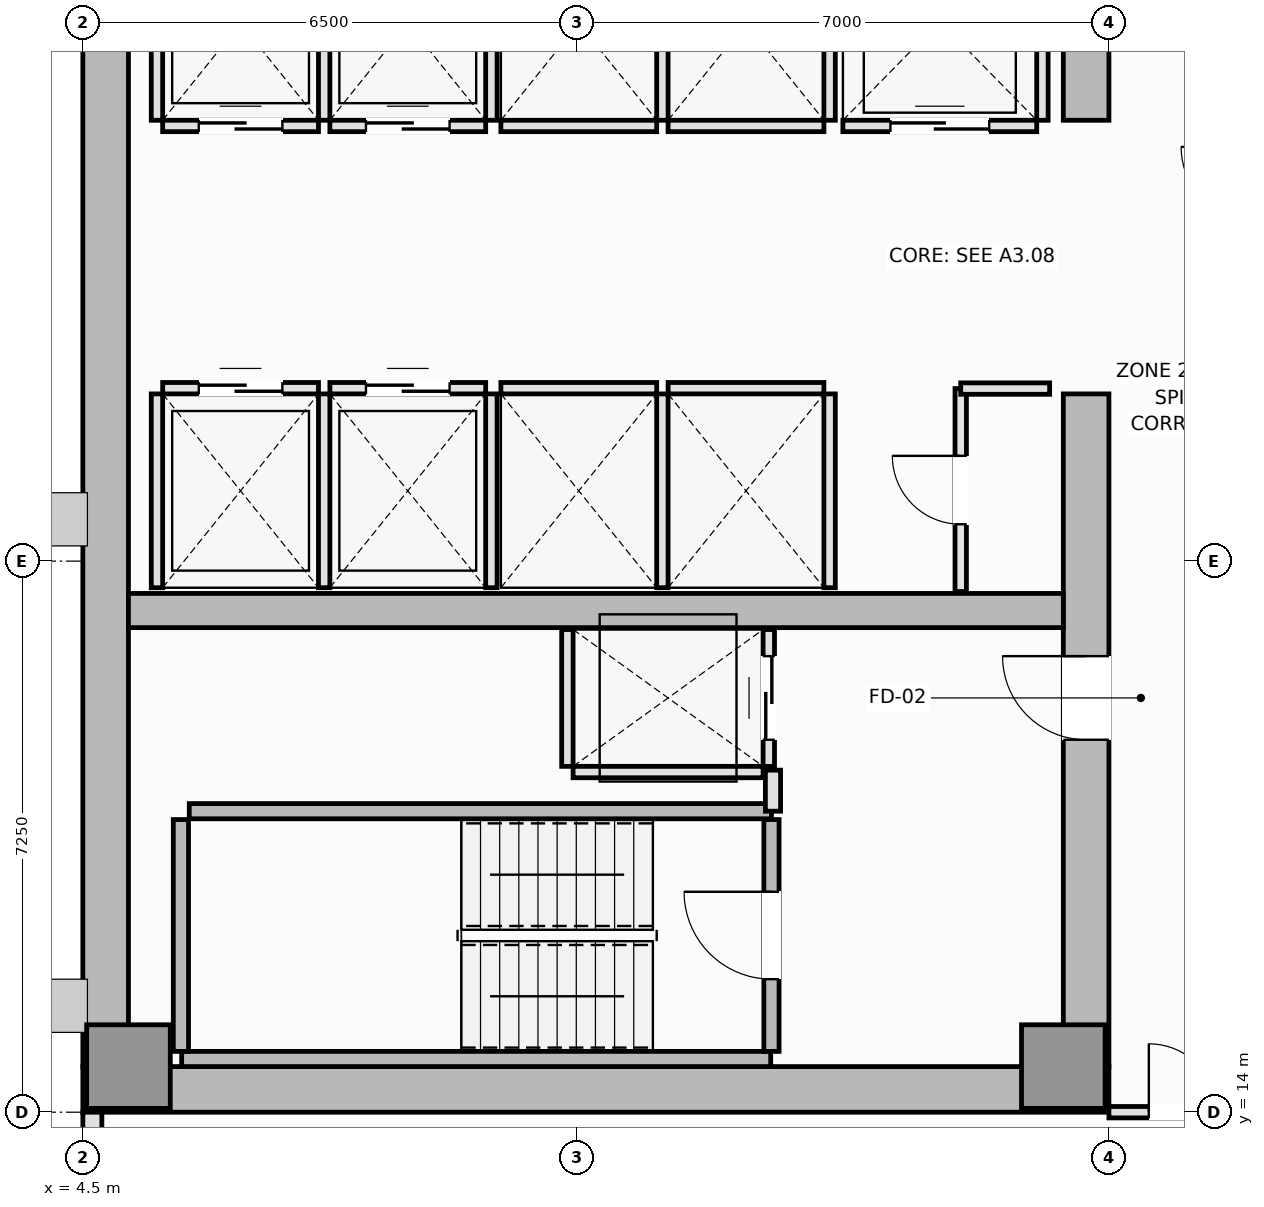
"""IFC4 building model, lengths in metres.
Left out: names, types, materials, properties, quantities, classifications, styles, units other than length and angle.
Written with IfcOpenShell. Run it as: python <this file> out.ifc"""

import sys

from ifc_helpers import new_model, si_unit, direction, frame, frame_2d, origin, origin_2d, place, context, subcontext, project, spatial, rectangle, extrude, element, fill, save


model = new_model("IFC4")
c1 = context("Model", 3, precision=1e-05, world=origin(), true_north=direction((0.0, 1.0)))
c2 = subcontext(c1, "Body", "Model", "MODEL_VIEW")
j1 = project(units=[si_unit("LENGTHUNIT", "METRE"), si_unit("PLANEANGLEUNIT", "RADIAN")], contexts=[c1])
p1 = place(None, origin())
s1 = spatial("IfcSite", under=j1, at=p1, CompositionType="ELEMENT")
p2 = place(p1, origin())
s2 = spatial("IfcBuilding", under=s1, at=p2, CompositionType="ELEMENT")
p3 = place(p2, frame((0.0, 0.0, 166.15)))
s3 = spatial("IfcBuildingStorey", under=s2, at=p3, CompositionType="ELEMENT", Elevation=166.15)
p4 = place(p3, frame((4.5, 14.3, 0.0), z_axis=(0.0, 0.0, 1.0), x_axis=(1.0, 0.0, 0.0)))
e1 = element("IfcWall", 1, at=p4, inside=s3, PredefinedType="SHEAR", context=c2, shape_type="SweptSolid", body=[
    extrude(rectangle(XDim=13.5, YDim=0.6, at=frame_2d((6.75, 0.0))), origin(), (0.0, 0.0, 1.0), 3.55),
])
p5 = place(p3, frame((4.8, 14.6, 0.0), z_axis=(0.0, 0.0, 1.0), x_axis=(0.0, 1.0, 0.0)))
e2 = element("IfcWall", 2, at=p5, inside=s3, PredefinedType="SHEAR", context=c2, shape_type="SweptSolid", body=[
    extrude(rectangle(XDim=21.3, YDim=0.6, at=frame_2d((10.65, 0.0))), origin(), (0.0, 0.0, 1.0), 3.55),
])
p6 = place(p3, frame((17.7, 14.6, 0.0), z_axis=(0.0, 0.0, 1.0), x_axis=(0.0, 1.0, 0.0)))
e3 = element("IfcWall", 3, at=p6, inside=s3, PredefinedType="SHEAR", context=c2, shape_type="SweptSolid", body=[
    extrude(rectangle(XDim=8.85, YDim=0.6, at=frame_2d((4.425, 0.0))), origin(), (0.0, 0.0, 1.0), 3.55),
])
p7 = place(p6, frame((4.3, 0.0, 0.0)))
e4 = element("IfcOpeningElement", 4, at=p7, cuts=e3, PredefinedType="OPENING", context=c2, shape_type="SweptSolid", body=[
    extrude(rectangle(XDim=1.1, YDim=2.15, at=frame_2d((0.55, 1.075))), frame((0.0, 0.31, 0.0), z_axis=(0.0, -1.0, 0.0), x_axis=(1.0, 0.0, 0.0)), (0.0, 0.0, 1.0), 0.62),
])
p8 = place(p3, frame((17.7, 27.05, 0.0), z_axis=(0.0, 0.0, 1.0), x_axis=(0.0, 1.0, 0.0)))
e5 = element("IfcWall", 5, at=p8, inside=s3, PredefinedType="SHEAR", context=c2, shape_type="SweptSolid", body=[
    extrude(rectangle(XDim=8.85, YDim=0.6, at=frame_2d((4.425, 0.0))), origin(), (0.0, 0.0, 1.0), 3.55),
])
p9 = place(p8, frame((3.45, 0.0, 0.0)))
e6 = element("IfcOpeningElement", 6, at=p9, cuts=e5, PredefinedType="OPENING", context=c2, shape_type="SweptSolid", body=[
    extrude(rectangle(XDim=1.1, YDim=2.15, at=frame_2d((0.55, 1.075))), frame((0.0, 0.31, 0.0), z_axis=(0.0, -1.0, 0.0), x_axis=(1.0, 0.0, 0.0)), (0.0, 0.0, 1.0), 0.62),
])
p10 = place(p3, frame((5.1, 20.6, 0.0), z_axis=(0.0, 0.0, 1.0), x_axis=(1.0, 0.0, 0.0)))
e7 = element("IfcWall", 7, at=p10, inside=s3, PredefinedType="SHEAR", context=c2, shape_type="SweptSolid", body=[
    extrude(rectangle(XDim=12.3, YDim=0.45, at=frame_2d((6.15, 0.0))), origin(), (0.0, 0.0, 1.0), 3.55),
])
for number, where, z_axis, x_axis in (
    (8, (5.1, 14.6, 0.0), (0.0, 0.0, 1.0), (1.0, 0.0, 0.0)),
    (9, (17.4, 14.6, 0.0), (0.0, 0.0, 1.0), (1.0, 0.0, 0.0)),
):
    element("IfcColumn", number, at=place(p3, frame(where, z_axis=z_axis, x_axis=x_axis)), inside=s3, PredefinedType="PILASTER", context=c2, shape_type="SweptSolid", body=[
        extrude(rectangle(XDim=1.1, YDim=1.1, at=origin_2d()), origin(), (0.0, 0.0, 1.0), 3.55),
    ])
p11 = place(p3, frame((4.625, 14.0, 0.0), z_axis=(0.0, 0.0, 1.0), x_axis=(0.0, -1.0, 0.0)))
e10 = element("IfcWall", 10, at=p11, inside=s3, PredefinedType="SOLIDWALL", context=c2, shape_type="SweptSolid", body=[
    extrude(rectangle(XDim=6.0, YDim=0.25, at=frame_2d((3.0, 0.0))), origin(), (0.0, 0.0, 1.0), 3.37),
])
p12 = place(p11, frame((1.9, 0.0, 0.9)))
e11 = element("IfcOpeningElement", 11, at=p12, cuts=e10, PredefinedType="OPENING", context=c2, shape_type="SweptSolid", body=[
    extrude(rectangle(XDim=2.2, YDim=1.8, at=frame_2d((1.1, 0.9))), frame((0.0, 0.135, 0.0), z_axis=(0.0, -1.0, 0.0), x_axis=(1.0, 0.0, 0.0)), (0.0, 0.0, 1.0), 0.27),
])
p13 = place(p3, frame((5.8, 14.7, 0.0), z_axis=(0.0, 0.0, 1.0), x_axis=(1.0, 0.0, 0.0)))
e12 = element("IfcWall", 12, at=p13, inside=s3, PredefinedType="SOLIDWALL", context=c2, shape_type="SweptSolid", body=[
    extrude(rectangle(XDim=7.75, YDim=0.2, at=frame_2d((3.875, 0.0))), origin(), (0.0, 0.0, 1.0), 3.55),
])
p14 = place(p3, frame((5.79, 14.8, 0.0), z_axis=(0.0, 0.0, 1.0), x_axis=(0.0, 1.0, 0.0)))
e13 = element("IfcWall", 13, at=p14, inside=s3, PredefinedType="SOLIDWALL", context=c2, shape_type="SweptSolid", body=[
    extrude(rectangle(XDim=3.05, YDim=0.2, at=frame_2d((1.525, 0.0))), origin(), (0.0, 0.0, 1.0), 3.55),
])
p15 = place(p3, frame((5.9, 17.96, 0.0), z_axis=(0.0, 0.0, 1.0), x_axis=(1.0, 0.0, 0.0)))
e14 = element("IfcWall", 14, at=p15, inside=s3, PredefinedType="SOLIDWALL", context=c2, shape_type="SweptSolid", body=[
    extrude(rectangle(XDim=7.66, YDim=0.2, at=frame_2d((3.83, 0.0))), origin(), (0.0, 0.0, 1.0), 3.55),
])
p16 = place(p3, frame((13.56, 14.8, 0.0), z_axis=(0.0, 0.0, 1.0), x_axis=(0.0, 1.0, 0.0)))
e15 = element("IfcWall", 15, at=p16, inside=s3, PredefinedType="SOLIDWALL", context=c2, shape_type="SweptSolid", body=[
    extrude(rectangle(XDim=3.05, YDim=0.2, at=frame_2d((1.525, 0.0))), origin(), (0.0, 0.0, 1.0), 3.55),
])
p17 = place(p16, frame((0.95, 0.0, 0.0)))
e16 = element("IfcOpeningElement", 16, at=p17, cuts=e15, PredefinedType="OPENING", context=c2, shape_type="SweptSolid", body=[
    extrude(rectangle(XDim=1.15, YDim=2.15, at=frame_2d((0.575, 1.075))), frame((0.0, 0.11, 0.0), z_axis=(0.0, -1.0, 0.0), x_axis=(1.0, 0.0, 0.0)), (0.0, 0.0, 1.0), 0.22),
])
p18 = place(p3, frame((5.55, 23.525, 0.0), z_axis=(0.0, 0.0, 1.0), x_axis=(1.0, 0.0, 0.0)))
e17 = element("IfcWall", 17, at=p18, inside=s3, PredefinedType="PARTITIONING", context=c2, shape_type="SweptSolid", body=[
    extrude(rectangle(XDim=2.05, YDim=0.15, at=frame_2d((1.025, 0.0))), origin(), (0.0, 0.0, 1.0), 3.37),
])
p19 = place(p18, frame((0.475, 0.0, 0.0)))
e18 = element("IfcOpeningElement", 18, at=p19, cuts=e17, PredefinedType="OPENING", context=c2, shape_type="SweptSolid", body=[
    extrude(rectangle(XDim=1.1, YDim=2.2, at=frame_2d((0.55, 1.1))), frame((0.0, 0.085, 0.0), z_axis=(0.0, -1.0, 0.0), x_axis=(1.0, 0.0, 0.0)), (0.0, 0.0, 1.0), 0.17),
])
for number, where, z_axis, x_axis in (
    (19, (5.475, 20.9, 0.0), (0.0, 0.0, 1.0), (0.0, 1.0, 0.0)),
    (20, (7.675, 20.9, 0.0), (0.0, 0.0, 1.0), (0.0, 1.0, 0.0)),
):
    element("IfcWall", number, at=place(p3, frame(where, z_axis=z_axis, x_axis=x_axis)), inside=s3, PredefinedType="PARTITIONING", context=c2, shape_type="SweptSolid", body=[
        extrude(rectangle(XDim=2.55, YDim=0.15, at=frame_2d((1.275, 0.0))), origin(), (0.0, 0.0, 1.0), 3.37),
    ])
p20 = place(p3, frame((7.75, 23.525, 0.0), z_axis=(0.0, 0.0, 1.0), x_axis=(1.0, 0.0, 0.0)))
e21 = element("IfcWall", 21, at=p20, inside=s3, PredefinedType="PARTITIONING", context=c2, shape_type="SweptSolid", body=[
    extrude(rectangle(XDim=2.05, YDim=0.15, at=frame_2d((1.025, 0.0))), origin(), (0.0, 0.0, 1.0), 3.37),
])
p21 = place(p20, frame((0.475, 0.0, 0.0)))
e22 = element("IfcOpeningElement", 22, at=p21, cuts=e21, PredefinedType="OPENING", context=c2, shape_type="SweptSolid", body=[
    extrude(rectangle(XDim=1.1, YDim=2.2, at=frame_2d((0.55, 1.1))), frame((0.0, 0.085, 0.0), z_axis=(0.0, -1.0, 0.0), x_axis=(1.0, 0.0, 0.0)), (0.0, 0.0, 1.0), 0.17),
])
p22 = place(p3, frame((9.875, 20.9, 0.0), z_axis=(0.0, 0.0, 1.0), x_axis=(0.0, 1.0, 0.0)))
e23 = element("IfcWall", 23, at=p22, inside=s3, PredefinedType="PARTITIONING", context=c2, shape_type="SweptSolid", body=[
    extrude(rectangle(XDim=2.55, YDim=0.15, at=frame_2d((1.275, 0.0))), origin(), (0.0, 0.0, 1.0), 3.37),
])
p23 = place(p3, frame((5.55, 26.975, 0.0), z_axis=(0.0, 0.0, 1.0), x_axis=(1.0, 0.0, 0.0)))
e24 = element("IfcWall", 24, at=p23, inside=s3, PredefinedType="PARTITIONING", context=c2, shape_type="SweptSolid", body=[
    extrude(rectangle(XDim=2.05, YDim=0.15, at=frame_2d((1.025, 0.0))), origin(), (0.0, 0.0, 1.0), 3.37),
])
p24 = place(p23, frame((0.475, 0.0, 0.0)))
e25 = element("IfcOpeningElement", 25, at=p24, cuts=e24, PredefinedType="OPENING", context=c2, shape_type="SweptSolid", body=[
    extrude(rectangle(XDim=1.1, YDim=2.2, at=frame_2d((0.55, 1.1))), frame((0.0, 0.085, 0.0), z_axis=(0.0, -1.0, 0.0), x_axis=(1.0, 0.0, 0.0)), (0.0, 0.0, 1.0), 0.17),
])
for number, where, z_axis, x_axis in (
    (26, (5.475, 27.05, 0.0), (0.0, 0.0, 1.0), (0.0, 1.0, 0.0)),
    (27, (7.675, 27.05, 0.0), (0.0, 0.0, 1.0), (0.0, 1.0, 0.0)),
):
    element("IfcWall", number, at=place(p3, frame(where, z_axis=z_axis, x_axis=x_axis)), inside=s3, PredefinedType="PARTITIONING", context=c2, shape_type="SweptSolid", body=[
        extrude(rectangle(XDim=2.55, YDim=0.15, at=frame_2d((1.275, 0.0))), origin(), (0.0, 0.0, 1.0), 3.37),
    ])
p25 = place(p3, frame((7.75, 26.975, 0.0), z_axis=(0.0, 0.0, 1.0), x_axis=(1.0, 0.0, 0.0)))
e28 = element("IfcWall", 28, at=p25, inside=s3, PredefinedType="PARTITIONING", context=c2, shape_type="SweptSolid", body=[
    extrude(rectangle(XDim=2.05, YDim=0.15, at=frame_2d((1.025, 0.0))), origin(), (0.0, 0.0, 1.0), 3.37),
])
p26 = place(p25, frame((0.475, 0.0, 0.0)))
e29 = element("IfcOpeningElement", 29, at=p26, cuts=e28, PredefinedType="OPENING", context=c2, shape_type="SweptSolid", body=[
    extrude(rectangle(XDim=1.1, YDim=2.2, at=frame_2d((0.55, 1.1))), frame((0.0, 0.085, 0.0), z_axis=(0.0, -1.0, 0.0), x_axis=(1.0, 0.0, 0.0)), (0.0, 0.0, 1.0), 0.17),
])
p27 = place(p3, frame((9.875, 27.05, 0.0), z_axis=(0.0, 0.0, 1.0), x_axis=(0.0, 1.0, 0.0)))
e30 = element("IfcWall", 30, at=p27, inside=s3, PredefinedType="PARTITIONING", context=c2, shape_type="SweptSolid", body=[
    extrude(rectangle(XDim=2.55, YDim=0.15, at=frame_2d((1.275, 0.0))), origin(), (0.0, 0.0, 1.0), 3.37),
])
p28 = place(p3, frame((10.0, 23.525, 0.0), z_axis=(0.0, 0.0, 1.0), x_axis=(1.0, 0.0, 0.0)))
e31 = element("IfcWall", 31, at=p28, inside=s3, PredefinedType="PARTITIONING", context=c2, shape_type="SweptSolid", body=[
    extrude(rectangle(XDim=2.05, YDim=0.15, at=frame_2d((1.025, 0.0))), origin(), (0.0, 0.0, 1.0), 3.37),
])
p29 = place(p3, frame((12.125, 20.9, 0.0), z_axis=(0.0, 0.0, 1.0), x_axis=(0.0, 1.0, 0.0)))
e32 = element("IfcWall", 32, at=p29, inside=s3, PredefinedType="PARTITIONING", context=c2, shape_type="SweptSolid", body=[
    extrude(rectangle(XDim=2.55, YDim=0.15, at=frame_2d((1.275, 0.0))), origin(), (0.0, 0.0, 1.0), 3.37),
])
p30 = place(p3, frame((12.2, 23.525, 0.0), z_axis=(0.0, 0.0, 1.0), x_axis=(1.0, 0.0, 0.0)))
e33 = element("IfcWall", 33, at=p30, inside=s3, PredefinedType="PARTITIONING", context=c2, shape_type="SweptSolid", body=[
    extrude(rectangle(XDim=2.05, YDim=0.15, at=frame_2d((1.025, 0.0))), origin(), (0.0, 0.0, 1.0), 3.37),
])
p31 = place(p3, frame((14.325, 20.9, 0.0), z_axis=(0.0, 0.0, 1.0), x_axis=(0.0, 1.0, 0.0)))
e34 = element("IfcWall", 34, at=p31, inside=s3, PredefinedType="PARTITIONING", context=c2, shape_type="SweptSolid", body=[
    extrude(rectangle(XDim=2.55, YDim=0.15, at=frame_2d((1.275, 0.0))), origin(), (0.0, 0.0, 1.0), 3.37),
])
p32 = place(p3, frame((10.0, 26.975, 0.0), z_axis=(0.0, 0.0, 1.0), x_axis=(1.0, 0.0, 0.0)))
e35 = element("IfcWall", 35, at=p32, inside=s3, PredefinedType="PARTITIONING", context=c2, shape_type="SweptSolid", body=[
    extrude(rectangle(XDim=2.05, YDim=0.15, at=frame_2d((1.025, 0.0))), origin(), (0.0, 0.0, 1.0), 3.37),
])
p33 = place(p3, frame((12.125, 27.05, 0.0), z_axis=(0.0, 0.0, 1.0), x_axis=(0.0, 1.0, 0.0)))
e36 = element("IfcWall", 36, at=p33, inside=s3, PredefinedType="PARTITIONING", context=c2, shape_type="SweptSolid", body=[
    extrude(rectangle(XDim=2.55, YDim=0.15, at=frame_2d((1.275, 0.0))), origin(), (0.0, 0.0, 1.0), 3.37),
])
p34 = place(p3, frame((12.2, 26.975, 0.0), z_axis=(0.0, 0.0, 1.0), x_axis=(1.0, 0.0, 0.0)))
e37 = element("IfcWall", 37, at=p34, inside=s3, PredefinedType="PARTITIONING", context=c2, shape_type="SweptSolid", body=[
    extrude(rectangle(XDim=2.05, YDim=0.15, at=frame_2d((1.025, 0.0))), origin(), (0.0, 0.0, 1.0), 3.37),
])
p35 = place(p3, frame((14.325, 27.05, 0.0), z_axis=(0.0, 0.0, 1.0), x_axis=(0.0, 1.0, 0.0)))
e38 = element("IfcWall", 38, at=p35, inside=s3, PredefinedType="PARTITIONING", context=c2, shape_type="SweptSolid", body=[
    extrude(rectangle(XDim=2.55, YDim=0.15, at=frame_2d((1.275, 0.0))), origin(), (0.0, 0.0, 1.0), 3.37),
])
p36 = place(p3, frame((14.5, 26.975, 0.0), z_axis=(0.0, 0.0, 1.0), x_axis=(1.0, 0.0, 0.0)))
e39 = element("IfcWall", 39, at=p36, inside=s3, PredefinedType="PARTITIONING", context=c2, shape_type="SweptSolid", body=[
    extrude(rectangle(XDim=2.55, YDim=0.15, at=frame_2d((1.275, 0.0))), origin(), (0.0, 0.0, 1.0), 3.37),
])
p37 = place(p36, frame((0.625, 0.0, 0.0)))
e40 = element("IfcOpeningElement", 40, at=p37, cuts=e39, PredefinedType="OPENING", context=c2, shape_type="SweptSolid", body=[
    extrude(rectangle(XDim=1.3, YDim=2.2, at=frame_2d((0.65, 1.1))), frame((0.0, 0.085, 0.0), z_axis=(0.0, -1.0, 0.0), x_axis=(1.0, 0.0, 0.0)), (0.0, 0.0, 1.0), 0.17),
])
p38 = place(p3, frame((17.125, 27.05, 0.0), z_axis=(0.0, 0.0, 1.0), x_axis=(0.0, 1.0, 0.0)))
e41 = element("IfcWall", 41, at=p38, inside=s3, PredefinedType="PARTITIONING", context=c2, shape_type="SweptSolid", body=[
    extrude(rectangle(XDim=2.6, YDim=0.15, at=frame_2d((1.3, 0.0))), origin(), (0.0, 0.0, 1.0), 3.37),
])
p39 = place(p3, frame((10.95, 18.475, 0.0), z_axis=(0.0, 0.0, 1.0), x_axis=(1.0, 0.0, 0.0)))
e42 = element("IfcWall", 42, at=p39, inside=s3, PredefinedType="PARTITIONING", context=c2, shape_type="SweptSolid", body=[
    extrude(rectangle(XDim=2.5, YDim=0.15, at=frame_2d((1.25, 0.0))), origin(), (0.0, 0.0, 1.0), 3.37),
])
p40 = place(p3, frame((10.875, 18.55, 0.0), z_axis=(0.0, 0.0, 1.0), x_axis=(0.0, 1.0, 0.0)))
e43 = element("IfcWall", 43, at=p40, inside=s3, PredefinedType="PARTITIONING", context=c2, shape_type="SweptSolid", body=[
    extrude(rectangle(XDim=1.8, YDim=0.15, at=frame_2d((0.9, 0.0))), origin(), (0.0, 0.0, 1.0), 3.37),
])
p41 = place(p3, frame((13.525, 18.55, 0.0), z_axis=(0.0, 0.0, 1.0), x_axis=(0.0, 1.0, 0.0)))
e44 = element("IfcWall", 44, at=p41, inside=s3, PredefinedType="PARTITIONING", context=c2, shape_type="SweptSolid", body=[
    extrude(rectangle(XDim=1.8, YDim=0.15, at=frame_2d((0.9, 0.0))), origin(), (0.0, 0.0, 1.0), 3.37),
])
p42 = place(p41, frame((0.35, 0.0, 0.0)))
e45 = element("IfcOpeningElement", 45, at=p42, cuts=e44, PredefinedType="OPENING", context=c2, shape_type="SweptSolid", body=[
    extrude(rectangle(XDim=1.1, YDim=2.2, at=frame_2d((0.55, 1.1))), frame((0.0, 0.085, 0.0), z_axis=(0.0, -1.0, 0.0), x_axis=(1.0, 0.0, 0.0)), (0.0, 0.0, 1.0), 0.17),
])
p43 = place(p3, frame((13.58, 17.96, 0.0), z_axis=(0.0, 0.0, 1.0), x_axis=(0.0, 1.0, 0.0)))
e46 = element("IfcWall", 46, at=p43, inside=s3, PredefinedType="PARTITIONING", context=c2, shape_type="SweptSolid", body=[
    extrude(rectangle(XDim=0.54, YDim=0.2, at=frame_2d((0.27, 0.0))), origin(), (0.0, 0.0, 1.0), 3.37),
])
p44 = place(p3, frame((16.05, 20.85, 0.0), z_axis=(0.0, 0.0, 1.0), x_axis=(0.0, 1.0, 0.0)))
e47 = element("IfcWall", 47, at=p44, inside=s3, PredefinedType="PARTITIONING", context=c2, shape_type="SweptSolid", body=[
    extrude(rectangle(XDim=2.67, YDim=0.15, at=frame_2d((1.335, 0.0))), origin(), (0.0, 0.0, 1.0), 3.37),
])
p45 = place(p44, frame((0.885, 0.0, 0.0)))
e48 = element("IfcOpeningElement", 48, at=p45, cuts=e47, PredefinedType="OPENING", context=c2, shape_type="SweptSolid", body=[
    extrude(rectangle(XDim=0.9, YDim=2.1, at=frame_2d((0.45, 1.05))), frame((0.0, 0.085, 0.0), z_axis=(0.0, -1.0, 0.0), x_axis=(1.0, 0.0, 0.0)), (0.0, 0.0, 1.0), 0.17),
])
p46 = place(p3, frame((16.05, 23.52, 0.0), z_axis=(0.0, 0.0, 1.0), x_axis=(1.0, 0.0, 0.0)))
e49 = element("IfcWall", 49, at=p46, inside=s3, PredefinedType="PARTITIONING", context=c2, shape_type="SweptSolid", body=[
    extrude(rectangle(XDim=1.17, YDim=0.15, at=frame_2d((0.585, 0.0))), origin(), (0.0, 0.0, 1.0), 3.37),
])
p47 = place(p3, frame((18.0, 14.0, 0.0), z_axis=(0.0, 0.0, 1.0), x_axis=(1.0, 0.0, 0.0)))
e50 = element("IfcWall", 50, at=p47, inside=s3, PredefinedType="PARTITIONING", context=c2, shape_type="SweptSolid", body=[
    extrude(rectangle(XDim=1.95, YDim=0.15, at=frame_2d((0.975, 0.0))), origin(), (0.0, 0.0, 1.0), 3.37),
])
p48 = place(p47, frame((0.525, 0.0, 0.0)))
e51 = element("IfcOpeningElement", 51, at=p48, cuts=e50, PredefinedType="OPENING", context=c2, shape_type="SweptSolid", body=[
    extrude(rectangle(XDim=0.9, YDim=2.1, at=frame_2d((0.45, 1.05))), frame((0.0, 0.085, 0.0), z_axis=(0.0, -1.0, 0.0), x_axis=(1.0, 0.0, 0.0)), (0.0, 0.0, 1.0), 0.17),
])
p49 = place(p17, origin())
e52 = element("IfcDoor", 52, at=p49, inside=s3, OperationType="SINGLE_SWING_RIGHT", PredefinedType="DOOR", context=c2, shape_type="SweptSolid", body=[
    extrude(rectangle(XDim=1.15, YDim=2.15, at=frame_2d((0.575, 1.075))), frame((0.0, 0.025, 0.0), z_axis=(0.0, -1.0, 0.0), x_axis=(1.0, 0.0, 0.0)), (0.0, 0.0, 1.0), 0.05),
])
fill(e16, e52)
p50 = place(p19, origin())
e53 = element("IfcDoor", 53, at=p50, inside=s3, OperationType="DOUBLE_DOOR_SLIDING", PredefinedType="DOOR", context=c2, shape_type="SweptSolid", body=[
    extrude(rectangle(XDim=1.1, YDim=2.2, at=frame_2d((0.55, 1.1))), frame((0.0, 0.025, 0.0), z_axis=(0.0, -1.0, 0.0), x_axis=(1.0, 0.0, 0.0)), (0.0, 0.0, 1.0), 0.05),
])
fill(e18, e53)
p51 = place(p21, origin())
e54 = element("IfcDoor", 54, at=p51, inside=s3, OperationType="DOUBLE_DOOR_SLIDING", PredefinedType="DOOR", context=c2, shape_type="SweptSolid", body=[
    extrude(rectangle(XDim=1.1, YDim=2.2, at=frame_2d((0.55, 1.1))), frame((0.0, 0.025, 0.0), z_axis=(0.0, -1.0, 0.0), x_axis=(1.0, 0.0, 0.0)), (0.0, 0.0, 1.0), 0.05),
])
fill(e22, e54)
p52 = place(p24, origin())
e55 = element("IfcDoor", 55, at=p52, inside=s3, OperationType="DOUBLE_DOOR_SLIDING", PredefinedType="DOOR", context=c2, shape_type="SweptSolid", body=[
    extrude(rectangle(XDim=1.1, YDim=2.2, at=frame_2d((0.55, 1.1))), frame((0.0, 0.025, 0.0), z_axis=(0.0, -1.0, 0.0), x_axis=(1.0, 0.0, 0.0)), (0.0, 0.0, 1.0), 0.05),
])
fill(e25, e55)
p53 = place(p26, origin())
e56 = element("IfcDoor", 56, at=p53, inside=s3, OperationType="DOUBLE_DOOR_SLIDING", PredefinedType="DOOR", context=c2, shape_type="SweptSolid", body=[
    extrude(rectangle(XDim=1.1, YDim=2.2, at=frame_2d((0.55, 1.1))), frame((0.0, 0.025, 0.0), z_axis=(0.0, -1.0, 0.0), x_axis=(1.0, 0.0, 0.0)), (0.0, 0.0, 1.0), 0.05),
])
fill(e29, e56)
p54 = place(p37, origin())
e57 = element("IfcDoor", 57, at=p54, inside=s3, OperationType="DOUBLE_DOOR_SLIDING", PredefinedType="DOOR", context=c2, shape_type="SweptSolid", body=[
    extrude(rectangle(XDim=1.3, YDim=2.2, at=frame_2d((0.65, 1.1))), frame((0.0, 0.025, 0.0), z_axis=(0.0, -1.0, 0.0), x_axis=(1.0, 0.0, 0.0)), (0.0, 0.0, 1.0), 0.05),
])
fill(e40, e57)
p55 = place(p42, origin())
e58 = element("IfcDoor", 58, at=p55, inside=s3, OperationType="DOUBLE_DOOR_SLIDING", PredefinedType="DOOR", context=c2, shape_type="SweptSolid", body=[
    extrude(rectangle(XDim=1.1, YDim=2.2, at=frame_2d((0.55, 1.1))), frame((0.0, 0.025, 0.0), z_axis=(0.0, -1.0, 0.0), x_axis=(1.0, 0.0, 0.0)), (0.0, 0.0, 1.0), 0.05),
])
fill(e45, e58)
p56 = place(p7, origin())
e59 = element("IfcDoor", 59, at=p56, inside=s3, OperationType="SINGLE_SWING_RIGHT", PredefinedType="DOOR", context=c2, shape_type="SweptSolid", body=[
    extrude(rectangle(XDim=1.1, YDim=2.15, at=frame_2d((0.55, 1.075))), frame((0.0, 0.025, 0.0), z_axis=(0.0, -1.0, 0.0), x_axis=(1.0, 0.0, 0.0)), (0.0, 0.0, 1.0), 0.05),
])
fill(e4, e59)
p57 = place(p45, origin())
e60 = element("IfcDoor", 60, at=p57, inside=s3, OperationType="SINGLE_SWING_RIGHT", PredefinedType="DOOR", context=c2, shape_type="SweptSolid", body=[
    extrude(rectangle(XDim=0.9, YDim=2.1, at=frame_2d((0.45, 1.05))), frame((0.0, 0.025, 0.0), z_axis=(0.0, -1.0, 0.0), x_axis=(1.0, 0.0, 0.0)), (0.0, 0.0, 1.0), 0.05),
])
fill(e48, e60)
p58 = place(p48, origin())
e61 = element("IfcDoor", 61, at=p58, inside=s3, OperationType="SINGLE_SWING_LEFT", PredefinedType="DOOR", context=c2, shape_type="SweptSolid", body=[
    extrude(rectangle(XDim=0.9, YDim=2.1, at=frame_2d((0.45, 1.05))), frame((0.0, 0.025, 0.0), z_axis=(0.0, -1.0, 0.0), x_axis=(1.0, 0.0, 0.0)), (0.0, 0.0, 1.0), 0.05),
])
fill(e51, e61)
save(model, sys.argv[1])
